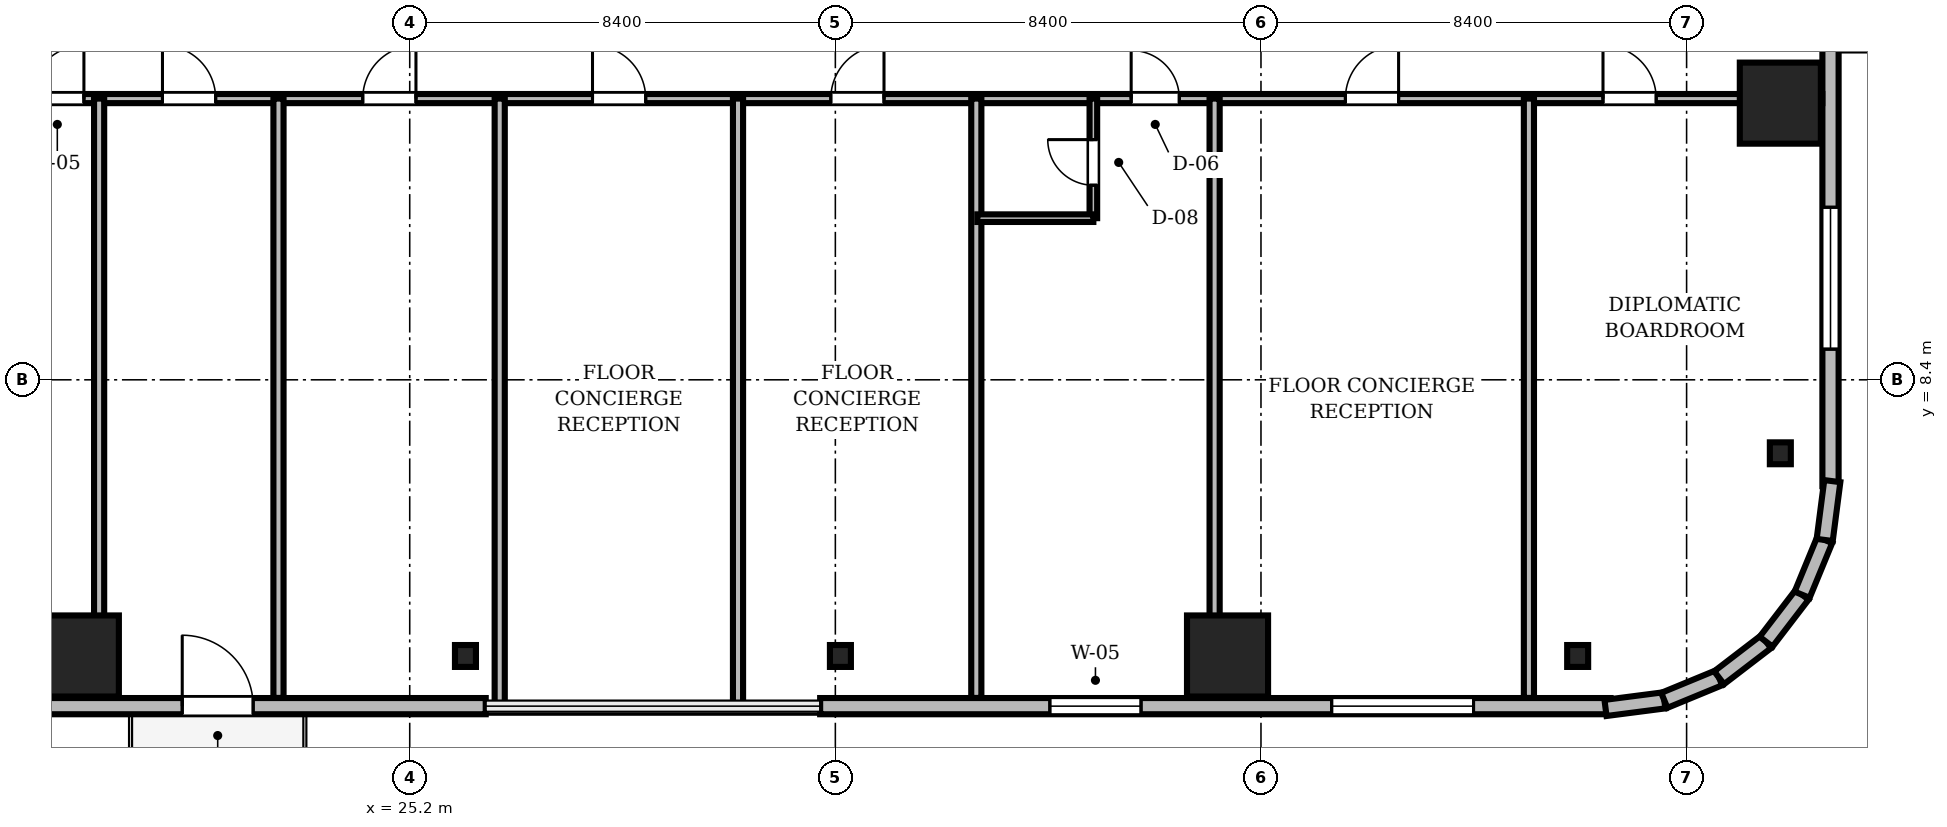
"""IFC4 building model, lengths in metres.
Left out: names, types, materials, properties, quantities, classifications, styles, units other than length and angle.
Written with IfcOpenShell. Run it as: python <this file> out.ifc"""

import sys

from ifc_helpers import new_model, si_unit, direction, frame, frame_2d, origin, origin_2d, place, context, subcontext, project, spatial, rectangle, i_section, extrude, source, transform, mapped, element, fill, save


model = new_model("IFC4")
c1 = context("Model", 3, precision=1e-05, world=origin(), true_north=direction((0.0, 1.0)))
c2 = subcontext(c1, "Body", "Model", "MODEL_VIEW")
j1 = project(units=[si_unit("LENGTHUNIT", "METRE"), si_unit("PLANEANGLEUNIT", "RADIAN")], contexts=[c1])
p1 = place(None, origin())
s1 = spatial("IfcSite", under=j1, at=p1, CompositionType="ELEMENT")
p2 = place(p1, origin())
s2 = spatial("IfcBuilding", under=s1, at=p2, CompositionType="ELEMENT")
p3 = place(p2, frame((0.0, 0.0, 155.7)))
s3 = spatial("IfcBuildingStorey", under=s2, at=p3, CompositionType="ELEMENT", Elevation=155.7)
m1 = source(origin(), c2, "Body", "SweptSolid", [
    extrude(rectangle(XDim=1.6, YDim=1.6, at=origin_2d()), origin(), (0.0, 0.0, 1.0), 3.46),
])
for number, where, z_axis, x_axis in (
    (1, (18.66, 2.95, 0.0), (0.0, 0.0, 1.0), (1.0, 0.0, 0.0)),
    (2, (41.34, 2.95, 0.0), (0.0, 0.0, 1.0), (1.0, 0.0, 0.0)),
    (3, (52.25, 13.86, 0.0), (0.0, 0.0, 1.0), (1.0, 0.0, 0.0)),
):
    element("IfcColumn", number, at=place(p3, frame(where, z_axis=z_axis, x_axis=x_axis)), inside=s3, PredefinedType="COLUMN", context=c2, shape_type="MappedRepresentation", body=[
        mapped(m1, transform((0.0, 0.0, 0.0), scale=1.0)),
    ])
m2 = source(origin(), c2, "Body", "SweptSolid", [
    extrude(i_section(OverallWidth=0.414, OverallDepth=0.432, WebThickness=0.026, FlangeThickness=0.04, FilletRadius=0.015, at=origin_2d()), origin(), (0.0, 0.0, 1.0), 3.46),
])
for number, where, z_axis, x_axis in (
    (4, (26.3, 2.95, 0.0), (0.0, 0.0, 1.0), (1.0, 0.0, 0.0)),
    (5, (33.7, 2.95, 0.0), (0.0, 0.0, 1.0), (1.0, 0.0, 0.0)),
    (6, (48.25, 2.95, 0.0), (0.0, 0.0, 1.0), (1.0, 0.0, 0.0)),
    (7, (52.25, 6.95, 0.0), (0.0, 0.0, 1.0), (1.0, 0.0, 0.0)),
):
    element("IfcColumn", number, at=place(p3, frame(where, z_axis=z_axis, x_axis=x_axis)), inside=s3, PredefinedType="COLUMN", context=c2, shape_type="MappedRepresentation", body=[
        mapped(m2, transform((0.0, 0.0, 0.0), scale=1.0)),
    ])
m3 = source(origin(), c2, "Body", "SweptSolid", [
    extrude(rectangle(XDim=15.6, YDim=0.32, at=frame_2d((7.8, 0.0))), origin(), (0.0, 0.0, 1.0), 3.46),
])
p4 = place(p3, frame((11.1, 1.96, 0.0), z_axis=(0.0, 0.0, 1.0), x_axis=(1.0, 0.0, 0.0)))
e8 = element("IfcWall", 8, at=p4, inside=s3, PredefinedType="SOLIDWALL", context=c2, shape_type="MappedRepresentation", body=[
    mapped(m3, transform((0.0, 0.0, 0.0), scale=1.0)),
])
m4 = source(origin(), c2, "Body", "SweptSolid", [
    extrude(rectangle(XDim=1.4, YDim=2.3, at=frame_2d((0.7, 1.15))), frame((0.0, 0.17, 0.0), z_axis=(0.0, -1.0, 0.0), x_axis=(1.0, 0.0, 0.0)), (0.0, 0.0, 1.0), 0.34),
])
p5 = place(p4, frame((9.61, 0.0, 0.0)))
e9 = element("IfcOpeningElement", 9, at=p5, cuts=e8, PredefinedType="OPENING", context=c2, shape_type="MappedRepresentation", body=[
    mapped(m4, transform((0.0, 0.0, 0.0), scale=1.0)),
])
m5 = source(origin(), c2, "Body", "SweptSolid", [
    extrude(rectangle(XDim=2.8, YDim=2.4, at=frame_2d((1.4, 1.2))), frame((0.0, 0.17, 0.0), z_axis=(0.0, -1.0, 0.0), x_axis=(1.0, 0.0, 0.0)), (0.0, 0.0, 1.0), 0.34),
])
p6 = place(p4, frame((2.705, 0.0, 0.72)))
e10 = element("IfcOpeningElement", 10, at=p6, cuts=e8, PredefinedType="OPENING", context=c2, shape_type="MappedRepresentation", body=[
    mapped(m5, transform((0.0, 0.0, 0.0), scale=1.0)),
])
p7 = place(p3, frame((33.3, 1.96, 0.0), z_axis=(0.0, 0.0, 1.0), x_axis=(1.0, 0.0, 0.0)))
e11 = element("IfcWall", 11, at=p7, inside=s3, PredefinedType="SOLIDWALL", context=c2, shape_type="MappedRepresentation", body=[
    mapped(m3, transform((0.0, 0.0, 0.0), scale=1.0)),
])
p8 = place(p7, frame((10.095, 0.0, 0.72)))
e12 = element("IfcOpeningElement", 12, at=p8, cuts=e11, PredefinedType="OPENING", context=c2, shape_type="MappedRepresentation", body=[
    mapped(m5, transform((0.0, 0.0, 0.0), scale=1.0)),
])
m6 = source(origin(), c2, "Body", "SweptSolid", [
    extrude(rectangle(XDim=1.8, YDim=2.4, at=frame_2d((0.9, 1.2))), frame((0.0, 0.17, 0.0), z_axis=(0.0, -1.0, 0.0), x_axis=(1.0, 0.0, 0.0)), (0.0, 0.0, 1.0), 0.34),
])
p9 = place(p7, frame((4.533, 0.0, 0.72)))
e13 = element("IfcOpeningElement", 13, at=p9, cuts=e11, PredefinedType="OPENING", context=c2, shape_type="MappedRepresentation", body=[
    mapped(m6, transform((0.0, 0.0, 0.0), scale=1.0)),
])
p10 = place(p3, frame((53.24, 6.3, 0.0), z_axis=(0.0, 0.0, 1.0), x_axis=(0.0, 1.0, 0.0)))
e14 = element("IfcWall", 14, at=p10, inside=s3, PredefinedType="SOLIDWALL", context=c2, shape_type="MappedRepresentation", body=[
    mapped(m3, transform((0.0, 0.0, 0.0), scale=1.0)),
])
p11 = place(p10, frame((9.61, 0.0, 0.0)))
e15 = element("IfcOpeningElement", 15, at=p11, cuts=e14, PredefinedType="OPENING", context=c2, shape_type="MappedRepresentation", body=[
    mapped(m4, transform((0.0, 0.0, 0.0), scale=1.0)),
])
p12 = place(p10, frame((2.705, 0.0, 0.72)))
e16 = element("IfcOpeningElement", 16, at=p12, cuts=e14, PredefinedType="OPENING", context=c2, shape_type="MappedRepresentation", body=[
    mapped(m5, transform((0.0, 0.0, 0.0), scale=1.0)),
])
m7 = source(origin(), c2, "Body", "SweptSolid", [
    extrude(rectangle(XDim=1.17, YDim=0.32, at=frame_2d((0.585, 0.0))), origin(), (0.0, 0.0, 1.0), 3.46),
])
p13 = place(p3, frame((48.8, 1.925, 0.0), z_axis=(0.0, 0.0, 1.0), x_axis=(0.991762485493, 0.128090485085, 0.0)))
e17 = element("IfcWall", 17, at=p13, inside=s3, PredefinedType="SOLIDWALL", context=c2, shape_type="MappedRepresentation", body=[
    mapped(m7, transform((0.0, 0.0, 0.0), scale=1.0)),
])
m8 = source(origin(), c2, "Body", "SweptSolid", [
    extrude(rectangle(XDim=1.169, YDim=0.32, at=frame_2d((0.585, 0.0))), origin(), (0.0, 0.0, 1.0), 3.46),
])
p14 = place(p3, frame((49.96, 2.074, 0.0), z_axis=(0.0, 0.0, 1.0), x_axis=(0.924479075121, 0.381232789334, 0.0)))
e18 = element("IfcWall", 18, at=p14, inside=s3, PredefinedType="SOLIDWALL", context=c2, shape_type="MappedRepresentation", body=[
    mapped(m8, transform((0.0, 0.0, 0.0), scale=1.0)),
])
m9 = source(origin(), c2, "Body", "SweptSolid", [
    extrude(rectangle(XDim=1.169, YDim=0.32, at=frame_2d((0.584, 0.0))), origin(), (0.0, 0.0, 1.0), 3.46),
])
p15 = place(p3, frame((51.041, 2.52, 0.0), z_axis=(0.0, 0.0, 1.0), x_axis=(0.793663520347, 0.608356981114, 0.0)))
e19 = element("IfcWall", 19, at=p15, inside=s3, PredefinedType="SOLIDWALL", context=c2, shape_type="MappedRepresentation", body=[
    mapped(m9, transform((0.0, 0.0, 0.0), scale=1.0)),
])
m10 = source(origin(), c2, "Body", "SweptSolid", [
    extrude(rectangle(XDim=1.169, YDim=0.32, at=frame_2d((0.584, 0.0))), origin(), (0.0, 0.0, 1.0), 3.46),
])
for number, where, z_axis, x_axis in (
    (20, (51.969, 3.231, 0.0), (0.0, 0.0, 1.0), (0.608, 0.794, 0.0)),
    (21, (52.68, 4.159, 0.0), (0.0, 0.0, 1.0), (0.381, 0.925, 0.0)),
):
    element("IfcWall", number, at=place(p3, frame(where, z_axis=z_axis, x_axis=x_axis)), inside=s3, PredefinedType="SOLIDWALL", context=c2, shape_type="MappedRepresentation", body=[
        mapped(m10, transform((0.0, 0.0, 0.0), scale=1.0)),
    ])
m11 = source(origin(), c2, "Body", "SweptSolid", [
    extrude(rectangle(XDim=1.171, YDim=0.32, at=frame_2d((0.585, 0.0))), origin(), (0.0, 0.0, 1.0), 3.46),
])
p16 = place(p3, frame((53.125, 5.24, 0.0), z_axis=(0.0, 0.0, 1.0), x_axis=(0.128269133229, 0.991739395941, 0.0)))
e22 = element("IfcWall", 22, at=p16, inside=s3, PredefinedType="SOLIDWALL", context=c2, shape_type="MappedRepresentation", body=[
    mapped(m11, transform((0.0, 0.0, 0.0), scale=1.0)),
])
m12 = source(origin(), c2, "Body", "SweptSolid", [
    extrude(rectangle(XDim=46.156, YDim=0.18, at=frame_2d((23.078, 0.0))), origin(), (0.0, 0.0, 1.0), 2.702),
])
p17 = place(p3, frame((6.922, 13.95, 0.0), z_axis=(0.0, 0.0, 1.0), x_axis=(1.0, 0.0, 0.0)))
e23 = element("IfcWall", 23, at=p17, inside=s3, PredefinedType="PARTITIONING", context=c2, shape_type="MappedRepresentation", body=[
    mapped(m12, transform((0.0, 0.0, 0.0), scale=1.0)),
])
m13 = source(origin(), c2, "Body", "SweptSolid", [
    extrude(rectangle(XDim=1.05, YDim=2.2, at=frame_2d((0.525, 1.1))), frame((0.0, 0.1, 0.0), z_axis=(0.0, -1.0, 0.0), x_axis=(1.0, 0.0, 0.0)), (0.0, 0.0, 1.0), 0.2),
])
p18 = place(p17, frame((10.798, 0.0, 0.0)))
e24 = element("IfcOpeningElement", 24, at=p18, cuts=e23, PredefinedType="OPENING", context=c2, shape_type="MappedRepresentation", body=[
    mapped(m13, transform((0.0, 0.0, 0.0), scale=1.0)),
])
p19 = place(p17, frame((13.398, 0.0, 0.0)))
e25 = element("IfcOpeningElement", 25, at=p19, cuts=e23, PredefinedType="OPENING", context=c2, shape_type="MappedRepresentation", body=[
    mapped(m13, transform((0.0, 0.0, 0.0), scale=1.0)),
])
p20 = place(p17, frame((17.351, 0.0, 0.0)))
e26 = element("IfcOpeningElement", 26, at=p20, cuts=e23, PredefinedType="OPENING", context=c2, shape_type="MappedRepresentation", body=[
    mapped(m13, transform((0.0, 0.0, 0.0), scale=1.0)),
])
p21 = place(p17, frame((21.885, 0.0, 0.0)))
e27 = element("IfcOpeningElement", 27, at=p21, cuts=e23, PredefinedType="OPENING", context=c2, shape_type="MappedRepresentation", body=[
    mapped(m13, transform((0.0, 0.0, 0.0), scale=1.0)),
])
p22 = place(p17, frame((26.588, 0.0, 0.0)))
e28 = element("IfcOpeningElement", 28, at=p22, cuts=e23, PredefinedType="OPENING", context=c2, shape_type="MappedRepresentation", body=[
    mapped(m13, transform((0.0, 0.0, 0.0), scale=1.0)),
])
m14 = source(origin(), c2, "Body", "SweptSolid", [
    extrude(rectangle(XDim=0.95, YDim=2.15, at=frame_2d((0.475, 1.075))), frame((0.0, 0.1, 0.0), z_axis=(0.0, -1.0, 0.0), x_axis=(1.0, 0.0, 0.0)), (0.0, 0.0, 1.0), 0.2),
])
p23 = place(p17, frame((32.516, 0.0, 0.0)))
e29 = element("IfcOpeningElement", 29, at=p23, cuts=e23, PredefinedType="OPENING", context=c2, shape_type="MappedRepresentation", body=[
    mapped(m14, transform((0.0, 0.0, 0.0), scale=1.0)),
])
p24 = place(p17, frame((36.744, 0.0, 0.0)))
e30 = element("IfcOpeningElement", 30, at=p24, cuts=e23, PredefinedType="OPENING", context=c2, shape_type="MappedRepresentation", body=[
    mapped(m13, transform((0.0, 0.0, 0.0), scale=1.0)),
])
p25 = place(p17, frame((41.828, 0.0, 0.0)))
e31 = element("IfcOpeningElement", 31, at=p25, cuts=e23, PredefinedType="OPENING", context=c2, shape_type="MappedRepresentation", body=[
    mapped(m13, transform((0.0, 0.0, 0.0), scale=1.0)),
])
m15 = source(origin(), c2, "Body", "SweptSolid", [
    extrude(rectangle(XDim=2.36, YDim=0.15, at=frame_2d((1.18, 0.0))), origin(), (0.0, 0.0, 1.0), 3.122),
])
p26 = place(p3, frame((38.692, 11.59, 0.0), z_axis=(0.0, 0.0, 1.0), x_axis=(0.0, 1.0, 0.0)))
e32 = element("IfcWall", 32, at=p26, inside=s3, PredefinedType="PARTITIONING", context=c2, shape_type="MappedRepresentation", body=[
    mapped(m15, transform((0.0, 0.0, 0.0), scale=1.0)),
])
m16 = source(origin(), c2, "Body", "SweptSolid", [
    extrude(rectangle(XDim=0.9, YDim=2.1, at=frame_2d((0.45, 1.05))), frame((0.0, 0.085, 0.0), z_axis=(0.0, -1.0, 0.0), x_axis=(1.0, 0.0, 0.0)), (0.0, 0.0, 1.0), 0.17),
])
p27 = place(p26, frame((0.65, 0.0, 0.0)))
e33 = element("IfcOpeningElement", 33, at=p27, cuts=e32, PredefinedType="OPENING", context=c2, shape_type="MappedRepresentation", body=[
    mapped(m16, transform((0.0, 0.0, 0.0), scale=1.0)),
])
m17 = source(origin(), c2, "Body", "SweptSolid", [
    extrude(rectangle(XDim=11.828, YDim=0.2, at=frame_2d((5.914, 0.0))), origin(), (0.0, 0.0, 1.0), 2.702),
])
for number, where, z_axis, x_axis in (
    (34, (19.07, 2.122, 0.0), (0.0, 0.0, 1.0), (0.0, 1.0, 0.0)),
    (35, (22.61, 2.122, 0.0), (0.0, 0.0, 1.0), (0.0, 1.0, 0.0)),
):
    element("IfcWall", number, at=place(p3, frame(where, z_axis=z_axis, x_axis=x_axis)), inside=s3, PredefinedType="PARTITIONING", context=c2, shape_type="MappedRepresentation", body=[
        mapped(m17, transform((0.0, 0.0, 0.0), scale=1.0)),
    ])
m18 = source(origin(), c2, "Body", "SweptSolid", [
    extrude(rectangle(XDim=12.02, YDim=0.2, at=frame_2d((6.01, 0.0))), origin(), (0.0, 0.0, 1.0), 2.702),
])
for number, where, z_axis, x_axis in (
    (36, (26.976, 1.93, 0.0), (0.0, 0.0, 1.0), (0.0, 1.0, 0.0)),
    (37, (31.679, 1.93, 0.0), (0.0, 0.0, 1.0), (0.0, 1.0, 0.0)),
):
    element("IfcWall", number, at=place(p3, frame(where, z_axis=z_axis, x_axis=x_axis)), inside=s3, PredefinedType="PARTITIONING", context=c2, shape_type="MappedRepresentation", body=[
        mapped(m18, transform((0.0, 0.0, 0.0), scale=1.0)),
    ])
for number, where, z_axis, x_axis in (
    (38, (36.382, 2.122, 0.0), (0.0, 0.0, 1.0), (0.0, 1.0, 0.0)),
    (39, (41.085, 2.122, 0.0), (0.0, 0.0, 1.0), (0.0, 1.0, 0.0)),
    (40, (47.288, 2.122, 0.0), (0.0, 0.0, 1.0), (0.0, 1.0, 0.0)),
):
    element("IfcWall", number, at=place(p3, frame(where, z_axis=z_axis, x_axis=x_axis)), inside=s3, PredefinedType="PARTITIONING", context=c2, shape_type="MappedRepresentation", body=[
        mapped(m17, transform((0.0, 0.0, 0.0), scale=1.0)),
    ])
m19 = source(origin(), c2, "Body", "SweptSolid", [
    extrude(rectangle(XDim=2.29, YDim=0.15, at=frame_2d((1.145, 0.0))), origin(), (0.0, 0.0, 1.0), 3.46),
])
p28 = place(p3, frame((36.402, 11.59, 0.0), z_axis=(0.0, 0.0, 1.0), x_axis=(1.0, 0.0, 0.0)))
e41 = element("IfcWall", 41, at=p28, inside=s3, PredefinedType="PARTITIONING", context=c2, shape_type="MappedRepresentation", body=[
    mapped(m19, transform((0.0, 0.0, 0.0), scale=1.0)),
])
m20 = source(origin(), c2, "Body", "SweptSolid", [
    extrude(rectangle(XDim=1.4, YDim=2.3, at=frame_2d((0.7, 1.15))), frame((0.0, 0.025, 0.0), z_axis=(0.0, -1.0, 0.0), x_axis=(1.0, 0.0, 0.0)), (0.0, 0.0, 1.0), 0.05),
])
p29 = place(p5, frame((1.4, 0.0, 0.0), z_axis=(0.0, 0.0, 1.0), x_axis=(-1.0, 0.0, 0.0)))
e42 = element("IfcDoor", 42, at=p29, inside=s3, OperationType="DOUBLE_DOOR_SLIDING", PredefinedType="DOOR", context=c2, shape_type="MappedRepresentation", body=[
    mapped(m20, transform((0.0, 0.0, 0.0), scale=1.0)),
])
fill(e9, e42)
m21 = source(origin(), c2, "Body", "SweptSolid", [
    extrude(rectangle(XDim=2.8, YDim=2.4, at=frame_2d((1.4, 1.2))), frame((0.0, 0.03, 0.0), z_axis=(0.0, -1.0, 0.0), x_axis=(1.0, 0.0, 0.0)), (0.0, 0.0, 1.0), 0.06),
])
p30 = place(p8, origin())
e43 = element("IfcWindow", 43, at=p30, inside=s3, PartitioningType="SINGLE_PANEL", PredefinedType="WINDOW", context=c2, shape_type="MappedRepresentation", body=[
    mapped(m21, transform((0.0, 0.0, 0.0), scale=1.0)),
])
fill(e12, e43)
p31 = place(p12, origin())
e44 = element("IfcWindow", 44, at=p31, inside=s3, PartitioningType="SINGLE_PANEL", PredefinedType="WINDOW", context=c2, shape_type="MappedRepresentation", body=[
    mapped(m21, transform((0.0, 0.0, 0.0), scale=1.0)),
])
fill(e16, e44)
m22 = source(origin(), c2, "Body", "SweptSolid", [
    extrude(rectangle(XDim=1.8, YDim=2.4, at=frame_2d((0.9, 1.2))), frame((0.0, 0.03, 0.0), z_axis=(0.0, -1.0, 0.0), x_axis=(1.0, 0.0, 0.0)), (0.0, 0.0, 1.0), 0.06),
])
p32 = place(p9, origin())
e45 = element("IfcWindow", 45, at=p32, inside=s3, PartitioningType="SINGLE_PANEL", PredefinedType="WINDOW", context=c2, shape_type="MappedRepresentation", body=[
    mapped(m22, transform((0.0, 0.0, 0.0), scale=1.0)),
])
fill(e13, e45)
m23 = source(origin(), c2, "Body", "SweptSolid", [
    extrude(rectangle(XDim=1.05, YDim=2.2, at=frame_2d((0.525, 1.1))), frame((0.0, 0.025, 0.0), z_axis=(0.0, -1.0, 0.0), x_axis=(1.0, 0.0, 0.0)), (0.0, 0.0, 1.0), 0.05),
])
p33 = place(p18, origin())
e46 = element("IfcDoor", 46, at=p33, inside=s3, OperationType="SINGLE_SWING_RIGHT", PredefinedType="DOOR", context=c2, shape_type="MappedRepresentation", body=[
    mapped(m23, transform((0.0, 0.0, 0.0), scale=1.0)),
])
fill(e24, e46)
p34 = place(p19, origin())
e47 = element("IfcDoor", 47, at=p34, inside=s3, OperationType="SINGLE_SWING_LEFT", PredefinedType="DOOR", context=c2, shape_type="MappedRepresentation", body=[
    mapped(m23, transform((0.0, 0.0, 0.0), scale=1.0)),
])
fill(e25, e47)
p35 = place(p20, origin())
e48 = element("IfcDoor", 48, at=p35, inside=s3, OperationType="SINGLE_SWING_RIGHT", PredefinedType="DOOR", context=c2, shape_type="MappedRepresentation", body=[
    mapped(m23, transform((0.0, 0.0, 0.0), scale=1.0)),
])
fill(e26, e48)
p36 = place(p21, origin())
e49 = element("IfcDoor", 49, at=p36, inside=s3, OperationType="SINGLE_SWING_LEFT", PredefinedType="DOOR", context=c2, shape_type="MappedRepresentation", body=[
    mapped(m23, transform((0.0, 0.0, 0.0), scale=1.0)),
])
fill(e27, e49)
p37 = place(p22, origin())
e50 = element("IfcDoor", 50, at=p37, inside=s3, OperationType="SINGLE_SWING_RIGHT", PredefinedType="DOOR", context=c2, shape_type="MappedRepresentation", body=[
    mapped(m23, transform((0.0, 0.0, 0.0), scale=1.0)),
])
fill(e28, e50)
m24 = source(origin(), c2, "Body", "SweptSolid", [
    extrude(rectangle(XDim=0.95, YDim=2.15, at=frame_2d((0.475, 1.075))), frame((0.0, 0.025, 0.0), z_axis=(0.0, -1.0, 0.0), x_axis=(1.0, 0.0, 0.0)), (0.0, 0.0, 1.0), 0.05),
])
p38 = place(p23, origin())
e51 = element("IfcDoor", 51, at=p38, inside=s3, OperationType="SINGLE_SWING_LEFT", PredefinedType="DOOR", context=c2, shape_type="MappedRepresentation", body=[
    mapped(m24, transform((0.0, 0.0, 0.0), scale=1.0)),
])
fill(e29, e51)
p39 = place(p24, origin())
e52 = element("IfcDoor", 52, at=p39, inside=s3, OperationType="SINGLE_SWING_RIGHT", PredefinedType="DOOR", context=c2, shape_type="MappedRepresentation", body=[
    mapped(m23, transform((0.0, 0.0, 0.0), scale=1.0)),
])
fill(e30, e52)
p40 = place(p25, origin())
e53 = element("IfcDoor", 53, at=p40, inside=s3, OperationType="SINGLE_SWING_LEFT", PredefinedType="DOOR", context=c2, shape_type="MappedRepresentation", body=[
    mapped(m23, transform((0.0, 0.0, 0.0), scale=1.0)),
])
fill(e31, e53)
m25 = source(origin(), c2, "Body", "SweptSolid", [
    extrude(rectangle(XDim=0.9, YDim=2.1, at=frame_2d((0.45, 1.05))), frame((0.0, 0.025, 0.0), z_axis=(0.0, -1.0, 0.0), x_axis=(1.0, 0.0, 0.0)), (0.0, 0.0, 1.0), 0.05),
])
p41 = place(p27, origin())
e54 = element("IfcDoor", 54, at=p41, inside=s3, OperationType="SINGLE_SWING_RIGHT", PredefinedType="DOOR", context=c2, shape_type="MappedRepresentation", body=[
    mapped(m25, transform((0.0, 0.0, 0.0), scale=1.0)),
])
fill(e33, e54)
save(model, sys.argv[1])
